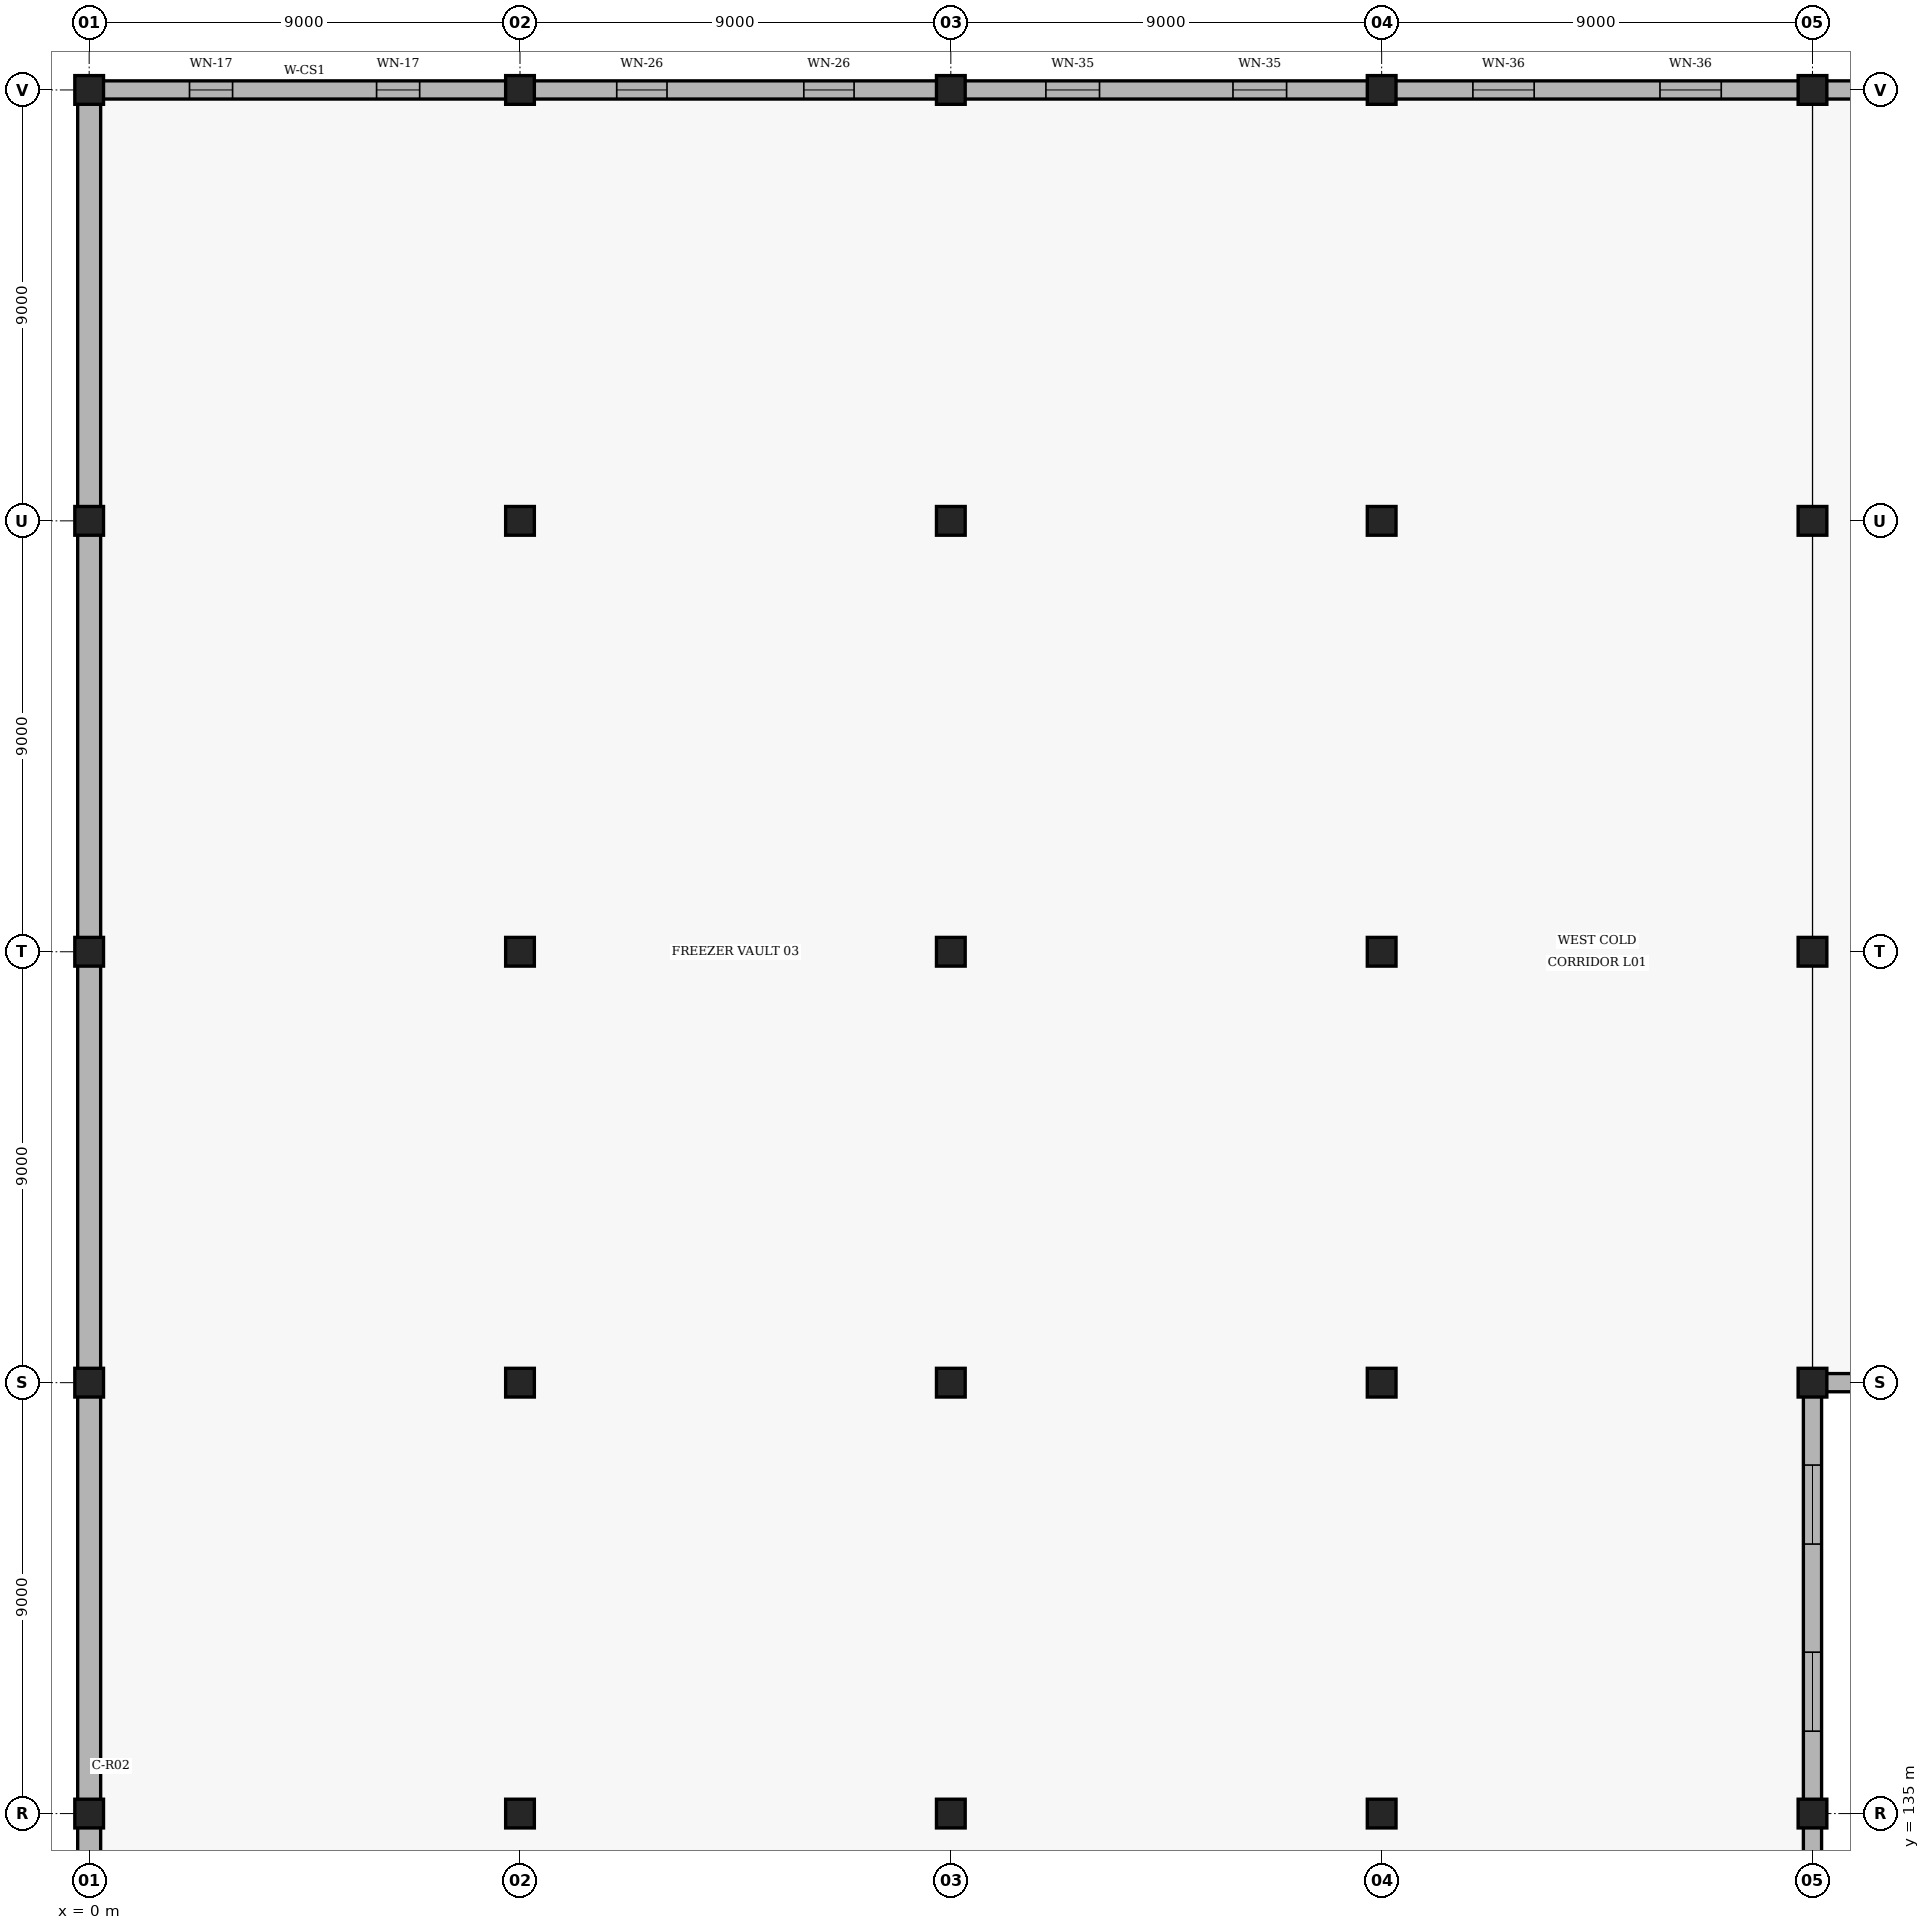
"""IFC4 building model, lengths in metres.
Left out: names, types, materials, properties, quantities, classifications, styles, units other than length and angle.
Written with IfcOpenShell. Run it as: python <this file> out.ifc"""

import sys

from ifc_helpers import new_model, si_unit, direction, frame, frame_2d, origin, origin_2d, place, context, subcontext, project, spatial, rectangle, extrude, element, fill, save


model = new_model("IFC4")
c1 = context("Model", 3, precision=1e-05, world=origin(), true_north=direction((0.0, 1.0)))
c2 = subcontext(c1, "Body", "Model", "MODEL_VIEW")
j1 = project(units=[si_unit("LENGTHUNIT", "METRE"), si_unit("PLANEANGLEUNIT", "RADIAN")], contexts=[c1])
p1 = place(None, origin())
s1 = spatial("IfcSite", under=j1, at=p1, CompositionType="ELEMENT")
p2 = place(p1, origin())
s2 = spatial("IfcBuilding", under=s1, at=p2, CompositionType="ELEMENT")
p3 = place(p2, frame((0.0, 0.0, 5.4)))
s3 = spatial("IfcBuildingStorey", under=s2, at=p3, CompositionType="ELEMENT", Elevation=5.4)
for number, where, z_axis, x_axis in (
    (1, (0.0, 135.0, 0.0), (0.0, 0.0, 1.0), (1.0, 0.0, 0.0)),
    (2, (0.0, 144.0, 0.0), (0.0, 0.0, 1.0), (1.0, 0.0, 0.0)),
    (3, (0.0, 153.0, 0.0), (0.0, 0.0, 1.0), (1.0, 0.0, 0.0)),
    (4, (0.0, 162.0, 0.0), (0.0, 0.0, 1.0), (1.0, 0.0, 0.0)),
    (5, (0.0, 171.0, 0.0), (0.0, 0.0, 1.0), (1.0, 0.0, 0.0)),
    (6, (9.0, 135.0, 0.0), (0.0, 0.0, 1.0), (1.0, 0.0, 0.0)),
    (7, (9.0, 144.0, 0.0), (0.0, 0.0, 1.0), (1.0, 0.0, 0.0)),
    (8, (9.0, 153.0, 0.0), (0.0, 0.0, 1.0), (1.0, 0.0, 0.0)),
    (9, (9.0, 162.0, 0.0), (0.0, 0.0, 1.0), (1.0, 0.0, 0.0)),
    (10, (9.0, 171.0, 0.0), (0.0, 0.0, 1.0), (1.0, 0.0, 0.0)),
    (11, (18.0, 135.0, 0.0), (0.0, 0.0, 1.0), (1.0, 0.0, 0.0)),
    (12, (18.0, 144.0, 0.0), (0.0, 0.0, 1.0), (1.0, 0.0, 0.0)),
    (13, (18.0, 153.0, 0.0), (0.0, 0.0, 1.0), (1.0, 0.0, 0.0)),
    (14, (18.0, 162.0, 0.0), (0.0, 0.0, 1.0), (1.0, 0.0, 0.0)),
    (15, (18.0, 171.0, 0.0), (0.0, 0.0, 1.0), (1.0, 0.0, 0.0)),
    (16, (27.0, 135.0, 0.0), (0.0, 0.0, 1.0), (1.0, 0.0, 0.0)),
    (17, (27.0, 144.0, 0.0), (0.0, 0.0, 1.0), (1.0, 0.0, 0.0)),
    (18, (27.0, 153.0, 0.0), (0.0, 0.0, 1.0), (1.0, 0.0, 0.0)),
    (19, (27.0, 162.0, 0.0), (0.0, 0.0, 1.0), (1.0, 0.0, 0.0)),
    (20, (27.0, 171.0, 0.0), (0.0, 0.0, 1.0), (1.0, 0.0, 0.0)),
    (21, (36.0, 135.0, 0.0), (0.0, 0.0, 1.0), (1.0, 0.0, 0.0)),
    (22, (36.0, 144.0, 0.0), (0.0, 0.0, 1.0), (1.0, 0.0, 0.0)),
    (23, (36.0, 153.0, 0.0), (0.0, 0.0, 1.0), (1.0, 0.0, 0.0)),
    (24, (36.0, 162.0, 0.0), (0.0, 0.0, 1.0), (1.0, 0.0, 0.0)),
    (25, (36.0, 171.0, 0.0), (0.0, 0.0, 1.0), (1.0, 0.0, 0.0)),
):
    element("IfcColumn", number, at=place(p3, frame(where, z_axis=z_axis, x_axis=x_axis)), inside=s3, PredefinedType="COLUMN", context=c2, shape_type="SweptSolid", body=[
        extrude(rectangle(XDim=0.6, YDim=0.6, at=origin_2d()), origin(), (0.0, 0.0, 1.0), 4.2),
    ])
p4 = place(p3, frame((0.06, 171.0, 0.0), z_axis=(0.0, 0.0, 1.0), x_axis=(1.0, 0.0, 0.0)))
e26 = element("IfcWall", 26, at=p4, inside=s3, PredefinedType="SOLIDWALL", context=c2, shape_type="SweptSolid", body=[
    extrude(rectangle(XDim=8.88, YDim=0.38, at=frame_2d((4.44, 0.0))), origin(), (0.0, 0.0, 1.0), 3.4),
])
p5 = place(p4, frame((2.036, 0.0, 0.9)))
e27 = element("IfcOpeningElement", 27, at=p5, cuts=e26, PredefinedType="OPENING", context=c2, shape_type="SweptSolid", body=[
    extrude(rectangle(XDim=0.9, YDim=1.2, at=frame_2d((0.45, 0.6))), frame((0.0, 0.2, 0.0), z_axis=(0.0, -1.0, 0.0), x_axis=(1.0, 0.0, 0.0)), (0.0, 0.0, 1.0), 0.4),
])
p6 = place(p4, frame((5.944, 0.0, 0.9)))
e28 = element("IfcOpeningElement", 28, at=p6, cuts=e26, PredefinedType="OPENING", context=c2, shape_type="SweptSolid", body=[
    extrude(rectangle(XDim=0.9, YDim=1.2, at=frame_2d((0.45, 0.6))), frame((0.0, 0.2, 0.0), z_axis=(0.0, -1.0, 0.0), x_axis=(1.0, 0.0, 0.0)), (0.0, 0.0, 1.0), 0.4),
])
p7 = place(p3, frame((9.06, 171.0, 0.0), z_axis=(0.0, 0.0, 1.0), x_axis=(1.0, 0.0, 0.0)))
e29 = element("IfcWall", 29, at=p7, inside=s3, PredefinedType="SOLIDWALL", context=c2, shape_type="SweptSolid", body=[
    extrude(rectangle(XDim=8.88, YDim=0.38, at=frame_2d((4.44, 0.0))), origin(), (0.0, 0.0, 1.0), 3.4),
])
p8 = place(p7, frame((1.961, 0.0, 0.9)))
e30 = element("IfcOpeningElement", 30, at=p8, cuts=e29, PredefinedType="OPENING", context=c2, shape_type="SweptSolid", body=[
    extrude(rectangle(XDim=1.05, YDim=1.35, at=frame_2d((0.525, 0.675))), frame((0.0, 0.2, 0.0), z_axis=(0.0, -1.0, 0.0), x_axis=(1.0, 0.0, 0.0)), (0.0, 0.0, 1.0), 0.4),
])
p9 = place(p7, frame((5.869, 0.0, 0.9)))
e31 = element("IfcOpeningElement", 31, at=p9, cuts=e29, PredefinedType="OPENING", context=c2, shape_type="SweptSolid", body=[
    extrude(rectangle(XDim=1.05, YDim=1.35, at=frame_2d((0.525, 0.675))), frame((0.0, 0.2, 0.0), z_axis=(0.0, -1.0, 0.0), x_axis=(1.0, 0.0, 0.0)), (0.0, 0.0, 1.0), 0.4),
])
p10 = place(p3, frame((18.06, 171.0, 0.0), z_axis=(0.0, 0.0, 1.0), x_axis=(1.0, 0.0, 0.0)))
e32 = element("IfcWall", 32, at=p10, inside=s3, PredefinedType="SOLIDWALL", context=c2, shape_type="SweptSolid", body=[
    extrude(rectangle(XDim=8.88, YDim=0.38, at=frame_2d((4.44, 0.0))), origin(), (0.0, 0.0, 1.0), 3.4),
])
p11 = place(p10, frame((1.926, 0.0, 0.9)))
e33 = element("IfcOpeningElement", 33, at=p11, cuts=e32, PredefinedType="OPENING", context=c2, shape_type="SweptSolid", body=[
    extrude(rectangle(XDim=1.12, YDim=1.55, at=frame_2d((0.56, 0.775))), frame((0.0, 0.2, 0.0), z_axis=(0.0, -1.0, 0.0), x_axis=(1.0, 0.0, 0.0)), (0.0, 0.0, 1.0), 0.4),
])
p12 = place(p10, frame((5.834, 0.0, 0.9)))
e34 = element("IfcOpeningElement", 34, at=p12, cuts=e32, PredefinedType="OPENING", context=c2, shape_type="SweptSolid", body=[
    extrude(rectangle(XDim=1.12, YDim=1.55, at=frame_2d((0.56, 0.775))), frame((0.0, 0.2, 0.0), z_axis=(0.0, -1.0, 0.0), x_axis=(1.0, 0.0, 0.0)), (0.0, 0.0, 1.0), 0.4),
])
p13 = place(p3, frame((27.06, 171.0, 0.0), z_axis=(0.0, 0.0, 1.0), x_axis=(1.0, 0.0, 0.0)))
e35 = element("IfcWall", 35, at=p13, inside=s3, PredefinedType="SOLIDWALL", context=c2, shape_type="SweptSolid", body=[
    extrude(rectangle(XDim=8.88, YDim=0.38, at=frame_2d((4.44, 0.0))), origin(), (0.0, 0.0, 1.0), 3.4),
])
p14 = place(p13, frame((1.846, 0.0, 0.9)))
e36 = element("IfcOpeningElement", 36, at=p14, cuts=e35, PredefinedType="OPENING", context=c2, shape_type="SweptSolid", body=[
    extrude(rectangle(XDim=1.28, YDim=1.65, at=frame_2d((0.64, 0.825))), frame((0.0, 0.2, 0.0), z_axis=(0.0, -1.0, 0.0), x_axis=(1.0, 0.0, 0.0)), (0.0, 0.0, 1.0), 0.4),
])
p15 = place(p13, frame((5.754, 0.0, 0.9)))
e37 = element("IfcOpeningElement", 37, at=p15, cuts=e35, PredefinedType="OPENING", context=c2, shape_type="SweptSolid", body=[
    extrude(rectangle(XDim=1.28, YDim=1.65, at=frame_2d((0.64, 0.825))), frame((0.0, 0.2, 0.0), z_axis=(0.0, -1.0, 0.0), x_axis=(1.0, 0.0, 0.0)), (0.0, 0.0, 1.0), 0.4),
])
p16 = place(p3, frame((36.06, 171.0, 0.0), z_axis=(0.0, 0.0, 1.0), x_axis=(1.0, 0.0, 0.0)))
e38 = element("IfcWall", 38, at=p16, inside=s3, PredefinedType="SOLIDWALL", context=c2, shape_type="SweptSolid", body=[
    extrude(rectangle(XDim=8.88, YDim=0.38, at=frame_2d((4.44, 0.0))), origin(), (0.0, 0.0, 1.0), 3.4),
])
p17 = place(p16, frame((2.036, 0.0, 0.9)))
e39 = element("IfcOpeningElement", 39, at=p17, cuts=e38, PredefinedType="OPENING", context=c2, shape_type="SweptSolid", body=[
    extrude(rectangle(XDim=0.9, YDim=1.2, at=frame_2d((0.45, 0.6))), frame((0.0, 0.2, 0.0), z_axis=(0.0, -1.0, 0.0), x_axis=(1.0, 0.0, 0.0)), (0.0, 0.0, 1.0), 0.4),
])
p18 = place(p16, frame((5.944, 0.0, 0.9)))
e40 = element("IfcOpeningElement", 40, at=p18, cuts=e38, PredefinedType="OPENING", context=c2, shape_type="SweptSolid", body=[
    extrude(rectangle(XDim=0.9, YDim=1.2, at=frame_2d((0.45, 0.6))), frame((0.0, 0.2, 0.0), z_axis=(0.0, -1.0, 0.0), x_axis=(1.0, 0.0, 0.0)), (0.0, 0.0, 1.0), 0.4),
])
for number, where, z_axis, x_axis in (
    (41, (0.0, 126.06, 0.0), (0.0, 0.0, 1.0), (0.0, 1.0, 0.0)),
    (42, (0.0, 135.06, 0.0), (0.0, 0.0, 1.0), (0.0, 1.0, 0.0)),
    (43, (0.0, 144.06, 0.0), (0.0, 0.0, 1.0), (0.0, 1.0, 0.0)),
    (44, (0.0, 153.06, 0.0), (0.0, 0.0, 1.0), (0.0, 1.0, 0.0)),
    (45, (0.0, 162.06, 0.0), (0.0, 0.0, 1.0), (0.0, 1.0, 0.0)),
):
    element("IfcWall", number, at=place(p3, frame(where, z_axis=z_axis, x_axis=x_axis)), inside=s3, PredefinedType="SOLIDWALL", context=c2, shape_type="SweptSolid", body=[
        extrude(rectangle(XDim=8.88, YDim=0.48, at=frame_2d((4.44, 0.0))), origin(), (0.0, 0.0, 1.0), 3.4),
    ])
p19 = place(p3, frame((36.0, 126.06, 0.0), z_axis=(0.0, 0.0, 1.0), x_axis=(0.0, 1.0, 0.0)))
e46 = element("IfcWall", 46, at=p19, inside=s3, PredefinedType="SOLIDWALL", context=c2, shape_type="SweptSolid", body=[
    extrude(rectangle(XDim=8.88, YDim=0.38, at=frame_2d((4.44, 0.0))), origin(), (0.0, 0.0, 1.0), 3.4),
])
p20 = place(p19, frame((1.661, 0.0, 0.9)))
e47 = element("IfcOpeningElement", 47, at=p20, cuts=e46, PredefinedType="OPENING", context=c2, shape_type="SweptSolid", body=[
    extrude(rectangle(XDim=1.65, YDim=1.5, at=frame_2d((0.825, 0.75))), frame((0.0, 0.2, 0.0), z_axis=(0.0, -1.0, 0.0), x_axis=(1.0, 0.0, 0.0)), (0.0, 0.0, 1.0), 0.4),
])
p21 = place(p19, frame((5.569, 0.0, 0.9)))
e48 = element("IfcOpeningElement", 48, at=p21, cuts=e46, PredefinedType="OPENING", context=c2, shape_type="SweptSolid", body=[
    extrude(rectangle(XDim=1.65, YDim=1.5, at=frame_2d((0.825, 0.75))), frame((0.0, 0.2, 0.0), z_axis=(0.0, -1.0, 0.0), x_axis=(1.0, 0.0, 0.0)), (0.0, 0.0, 1.0), 0.4),
])
p22 = place(p3, frame((36.0, 135.06, 0.0), z_axis=(0.0, 0.0, 1.0), x_axis=(0.0, 1.0, 0.0)))
e49 = element("IfcWall", 49, at=p22, inside=s3, PredefinedType="SOLIDWALL", context=c2, shape_type="SweptSolid", body=[
    extrude(rectangle(XDim=8.88, YDim=0.38, at=frame_2d((4.44, 0.0))), origin(), (0.0, 0.0, 1.0), 3.4),
])
p23 = place(p22, frame((1.661, 0.0, 0.9)))
e50 = element("IfcOpeningElement", 50, at=p23, cuts=e49, PredefinedType="OPENING", context=c2, shape_type="SweptSolid", body=[
    extrude(rectangle(XDim=1.65, YDim=1.5, at=frame_2d((0.825, 0.75))), frame((0.0, 0.2, 0.0), z_axis=(0.0, -1.0, 0.0), x_axis=(1.0, 0.0, 0.0)), (0.0, 0.0, 1.0), 0.4),
])
p24 = place(p22, frame((5.569, 0.0, 0.9)))
e51 = element("IfcOpeningElement", 51, at=p24, cuts=e49, PredefinedType="OPENING", context=c2, shape_type="SweptSolid", body=[
    extrude(rectangle(XDim=1.65, YDim=1.5, at=frame_2d((0.825, 0.75))), frame((0.0, 0.2, 0.0), z_axis=(0.0, -1.0, 0.0), x_axis=(1.0, 0.0, 0.0)), (0.0, 0.0, 1.0), 0.4),
])
p25 = place(p3, frame((36.06, 144.0, 0.0), z_axis=(0.0, 0.0, 1.0), x_axis=(1.0, 0.0, 0.0)))
e52 = element("IfcWall", 52, at=p25, inside=s3, PredefinedType="SOLIDWALL", context=c2, shape_type="SweptSolid", body=[
    extrude(rectangle(XDim=8.88, YDim=0.38, at=frame_2d((4.44, 0.0))), origin(), (0.0, 0.0, 1.0), 3.4),
])
p26 = place(p25, frame((1.661, 0.0, 0.9)))
e53 = element("IfcOpeningElement", 53, at=p26, cuts=e52, PredefinedType="OPENING", context=c2, shape_type="SweptSolid", body=[
    extrude(rectangle(XDim=1.65, YDim=1.5, at=frame_2d((0.825, 0.75))), frame((0.0, 0.2, 0.0), z_axis=(0.0, -1.0, 0.0), x_axis=(1.0, 0.0, 0.0)), (0.0, 0.0, 1.0), 0.4),
])
p27 = place(p25, frame((5.569, 0.0, 0.9)))
e54 = element("IfcOpeningElement", 54, at=p27, cuts=e52, PredefinedType="OPENING", context=c2, shape_type="SweptSolid", body=[
    extrude(rectangle(XDim=1.65, YDim=1.5, at=frame_2d((0.825, 0.75))), frame((0.0, 0.2, 0.0), z_axis=(0.0, -1.0, 0.0), x_axis=(1.0, 0.0, 0.0)), (0.0, 0.0, 1.0), 0.4),
])
p28 = place(p5, origin())
e55 = element("IfcWindow", 55, at=p28, inside=s3, PartitioningType="SINGLE_PANEL", PredefinedType="WINDOW", context=c2, shape_type="SweptSolid", body=[
    extrude(rectangle(XDim=0.9, YDim=1.2, at=frame_2d((0.45, 0.6))), frame((0.0, 0.03, 0.0), z_axis=(0.0, -1.0, 0.0), x_axis=(1.0, 0.0, 0.0)), (0.0, 0.0, 1.0), 0.06),
])
fill(e27, e55)
p29 = place(p6, origin())
e56 = element("IfcWindow", 56, at=p29, inside=s3, PartitioningType="SINGLE_PANEL", PredefinedType="WINDOW", context=c2, shape_type="SweptSolid", body=[
    extrude(rectangle(XDim=0.9, YDim=1.2, at=frame_2d((0.45, 0.6))), frame((0.0, 0.03, 0.0), z_axis=(0.0, -1.0, 0.0), x_axis=(1.0, 0.0, 0.0)), (0.0, 0.0, 1.0), 0.06),
])
fill(e28, e56)
p30 = place(p8, origin())
e57 = element("IfcWindow", 57, at=p30, inside=s3, PartitioningType="SINGLE_PANEL", PredefinedType="WINDOW", context=c2, shape_type="SweptSolid", body=[
    extrude(rectangle(XDim=1.05, YDim=1.35, at=frame_2d((0.525, 0.675))), frame((0.0, 0.03, 0.0), z_axis=(0.0, -1.0, 0.0), x_axis=(1.0, 0.0, 0.0)), (0.0, 0.0, 1.0), 0.06),
])
fill(e30, e57)
p31 = place(p9, origin())
e58 = element("IfcWindow", 58, at=p31, inside=s3, PartitioningType="SINGLE_PANEL", PredefinedType="WINDOW", context=c2, shape_type="SweptSolid", body=[
    extrude(rectangle(XDim=1.05, YDim=1.35, at=frame_2d((0.525, 0.675))), frame((0.0, 0.03, 0.0), z_axis=(0.0, -1.0, 0.0), x_axis=(1.0, 0.0, 0.0)), (0.0, 0.0, 1.0), 0.06),
])
fill(e31, e58)
p32 = place(p11, origin())
e59 = element("IfcWindow", 59, at=p32, inside=s3, PartitioningType="SINGLE_PANEL", PredefinedType="WINDOW", context=c2, shape_type="SweptSolid", body=[
    extrude(rectangle(XDim=1.12, YDim=1.55, at=frame_2d((0.56, 0.775))), frame((0.0, 0.03, 0.0), z_axis=(0.0, -1.0, 0.0), x_axis=(1.0, 0.0, 0.0)), (0.0, 0.0, 1.0), 0.06),
])
fill(e33, e59)
p33 = place(p12, origin())
e60 = element("IfcWindow", 60, at=p33, inside=s3, PartitioningType="SINGLE_PANEL", PredefinedType="WINDOW", context=c2, shape_type="SweptSolid", body=[
    extrude(rectangle(XDim=1.12, YDim=1.55, at=frame_2d((0.56, 0.775))), frame((0.0, 0.03, 0.0), z_axis=(0.0, -1.0, 0.0), x_axis=(1.0, 0.0, 0.0)), (0.0, 0.0, 1.0), 0.06),
])
fill(e34, e60)
p34 = place(p14, origin())
e61 = element("IfcWindow", 61, at=p34, inside=s3, PartitioningType="SINGLE_PANEL", PredefinedType="WINDOW", context=c2, shape_type="SweptSolid", body=[
    extrude(rectangle(XDim=1.28, YDim=1.65, at=frame_2d((0.64, 0.825))), frame((0.0, 0.03, 0.0), z_axis=(0.0, -1.0, 0.0), x_axis=(1.0, 0.0, 0.0)), (0.0, 0.0, 1.0), 0.06),
])
fill(e36, e61)
p35 = place(p15, origin())
e62 = element("IfcWindow", 62, at=p35, inside=s3, PartitioningType="SINGLE_PANEL", PredefinedType="WINDOW", context=c2, shape_type="SweptSolid", body=[
    extrude(rectangle(XDim=1.28, YDim=1.65, at=frame_2d((0.64, 0.825))), frame((0.0, 0.03, 0.0), z_axis=(0.0, -1.0, 0.0), x_axis=(1.0, 0.0, 0.0)), (0.0, 0.0, 1.0), 0.06),
])
fill(e37, e62)
p36 = place(p23, origin())
e63 = element("IfcWindow", 63, at=p36, inside=s3, PartitioningType="SINGLE_PANEL", PredefinedType="WINDOW", context=c2, shape_type="SweptSolid", body=[
    extrude(rectangle(XDim=1.65, YDim=1.5, at=frame_2d((0.825, 0.75))), frame((0.0, 0.03, 0.0), z_axis=(0.0, -1.0, 0.0), x_axis=(1.0, 0.0, 0.0)), (0.0, 0.0, 1.0), 0.06),
])
fill(e50, e63)
p37 = place(p24, origin())
e64 = element("IfcWindow", 64, at=p37, inside=s3, PartitioningType="SINGLE_PANEL", PredefinedType="WINDOW", context=c2, shape_type="SweptSolid", body=[
    extrude(rectangle(XDim=1.65, YDim=1.5, at=frame_2d((0.825, 0.75))), frame((0.0, 0.03, 0.0), z_axis=(0.0, -1.0, 0.0), x_axis=(1.0, 0.0, 0.0)), (0.0, 0.0, 1.0), 0.06),
])
fill(e51, e64)
save(model, sys.argv[1])
